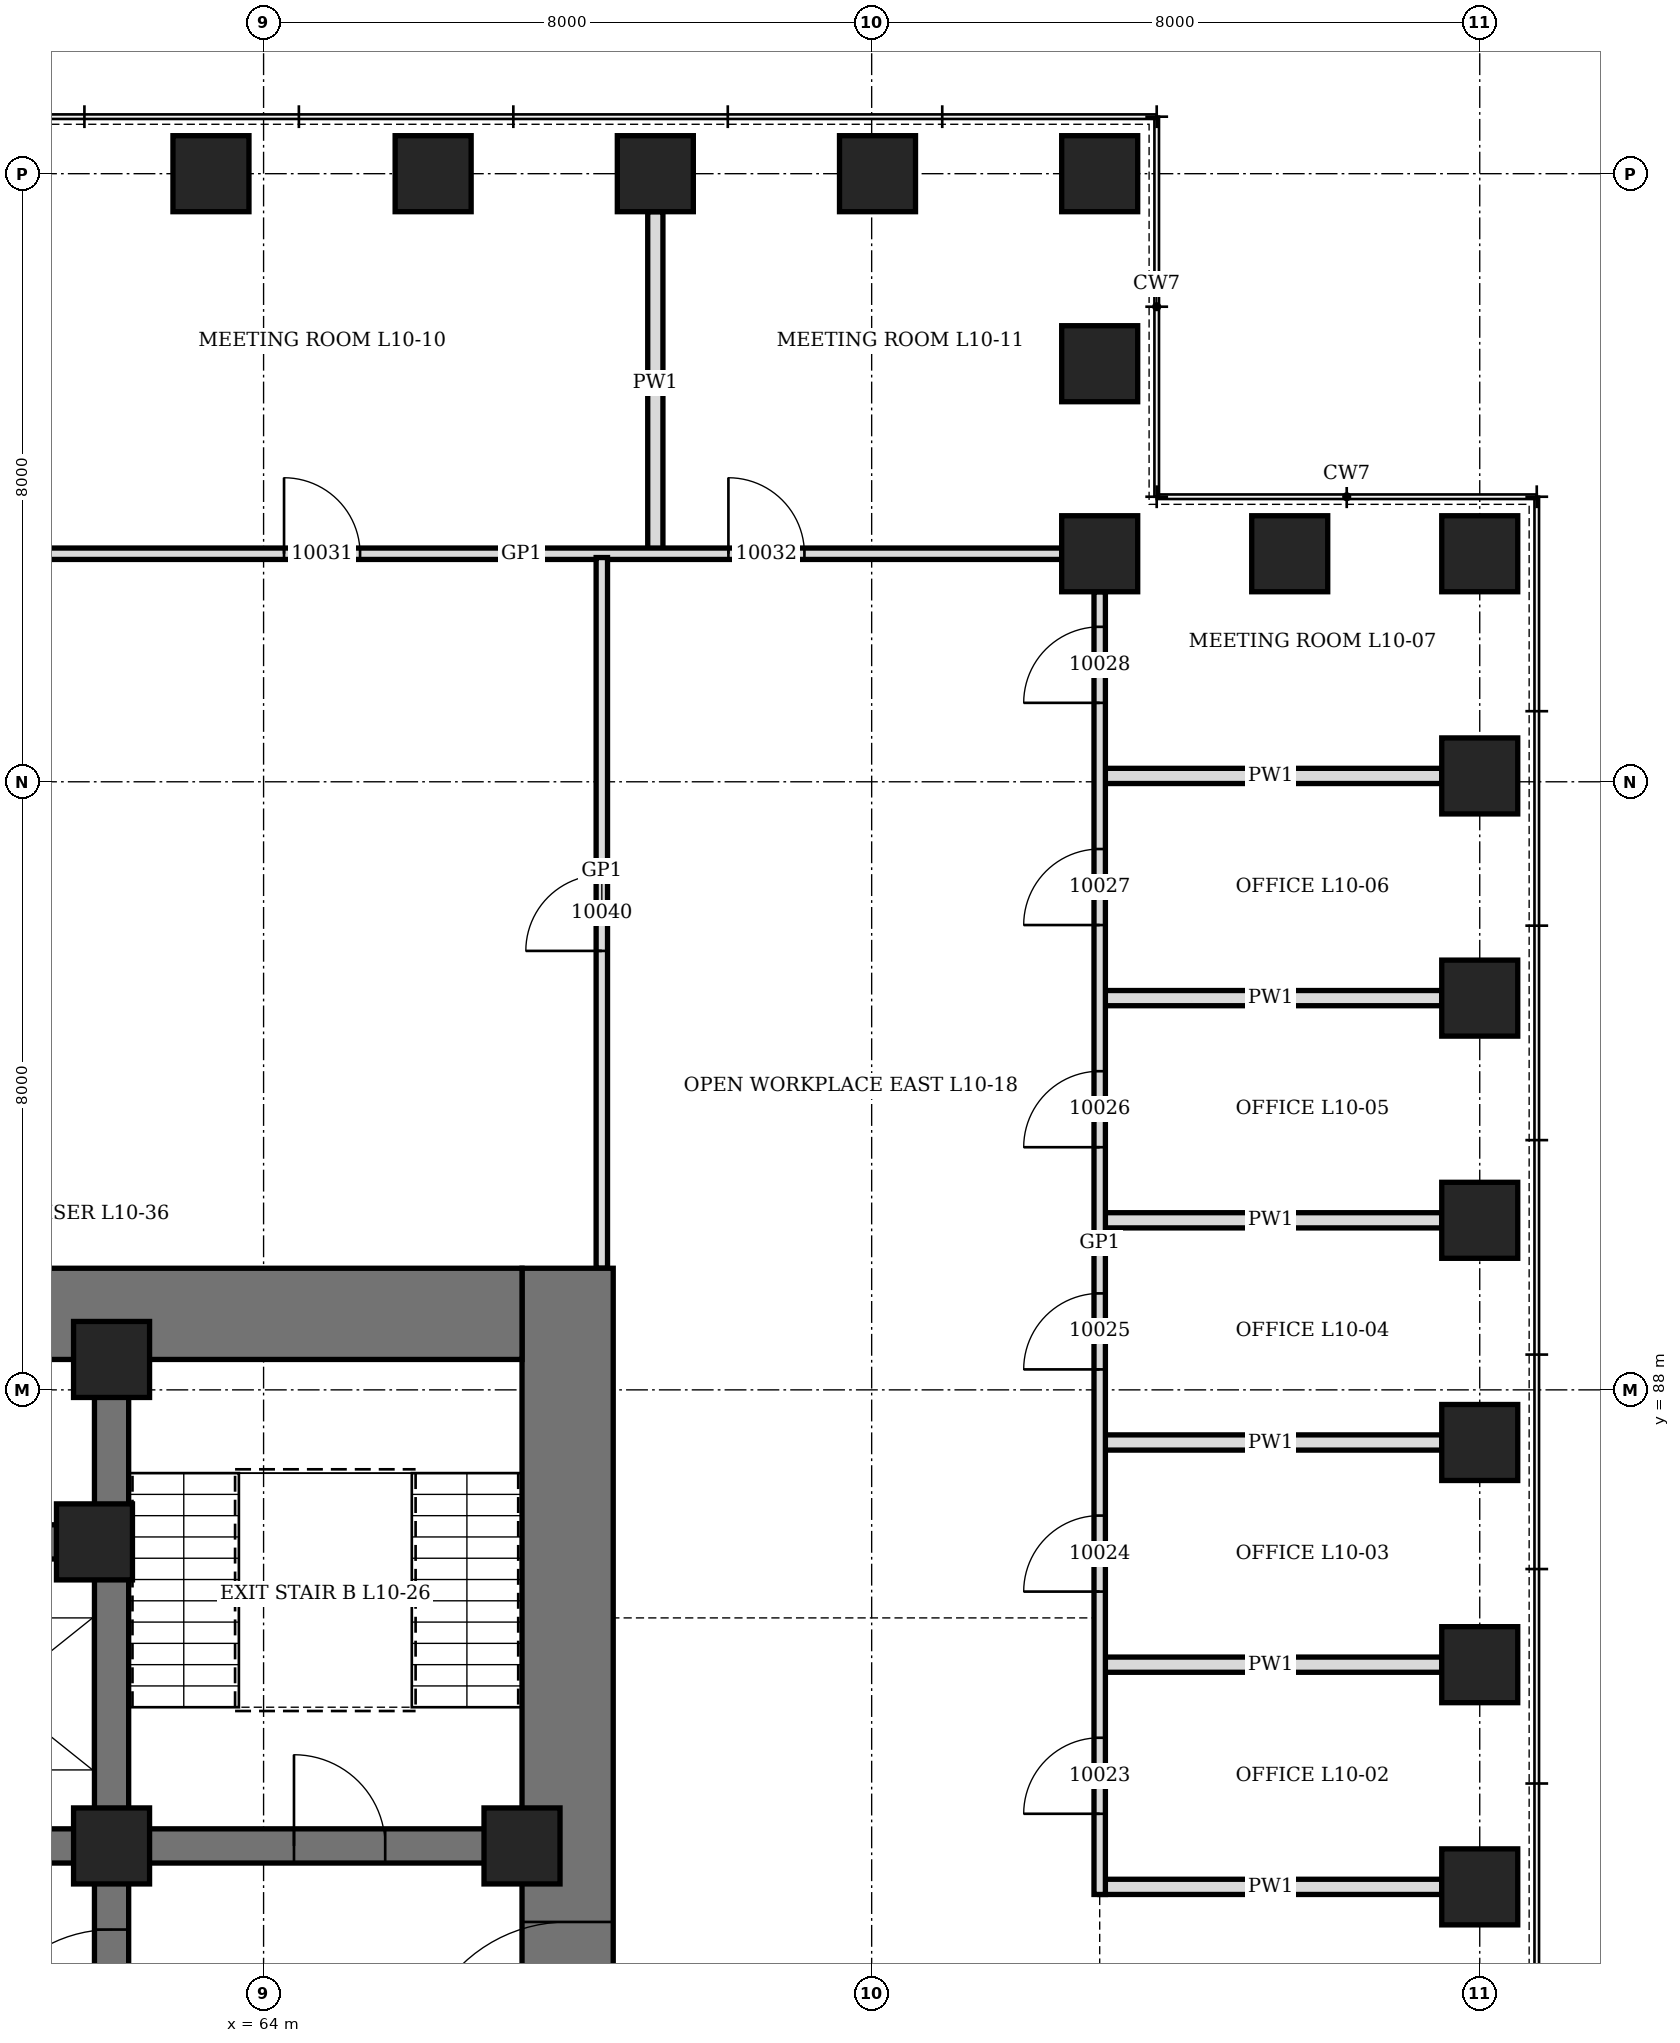
"""IFC4 building model, lengths in metres.
Left out: names, types, materials, properties, quantities, classifications, styles, units other than length and angle.
Written with IfcOpenShell. Run it as: python <this file> out.ifc"""

import sys

from ifc_helpers import new_model, si_unit, direction, frame, frame_2d, origin, origin_2d, place, context, subcontext, project, spatial, rectangle, hollow_rectangle, extrude, element, fill, save


model = new_model("IFC4")
c1 = context("Model", 3, precision=1e-05, world=origin(), true_north=direction((0.0, 1.0)))
c2 = subcontext(c1, "Body", "Model", "MODEL_VIEW")
j1 = project(units=[si_unit("LENGTHUNIT", "METRE"), si_unit("PLANEANGLEUNIT", "RADIAN")], contexts=[c1])
p1 = place(None, origin())
s1 = spatial("IfcSite", under=j1, at=p1, CompositionType="ELEMENT")
p2 = place(p1, origin())
s2 = spatial("IfcBuilding", under=s1, at=p2, CompositionType="ELEMENT")
p3 = place(p2, frame((0.0, 0.0, 51.7)))
s3 = spatial("IfcBuildingStorey", under=s2, at=p3, CompositionType="ELEMENT", Elevation=51.7)
for number, where, z_axis, x_axis in (
    (1, (80.0, 81.461, 0.0), (0.0, 0.0, 1.0), (0.0, 1.0, 0.0)),
    (2, (80.0, 84.385, 0.0), (0.0, 0.0, 1.0), (0.0, 1.0, 0.0)),
    (3, (80.0, 87.308, 0.0), (0.0, 0.0, 1.0), (0.0, 1.0, 0.0)),
    (4, (80.0, 90.231, 0.0), (0.0, 0.0, 1.0), (0.0, 1.0, 0.0)),
    (5, (80.0, 93.154, 0.0), (0.0, 0.0, 1.0), (0.0, 1.0, 0.0)),
    (6, (80.0, 96.077, 0.0), (0.0, 0.0, 1.0), (0.0, 1.0, 0.0)),
    (7, (80.0, 99.0, 0.0), (0.0, 0.0, 1.0), (1.0, 0.0, 0.0)),
    (8, (77.5, 99.0, 0.0), (0.0, 0.0, 1.0), (1.0, 0.0, 0.0)),
    (9, (75.0, 99.0, 0.0), (0.0, 0.0, 1.0), (0.0, 1.0, 0.0)),
    (10, (75.0, 101.5, 0.0), (0.0, 0.0, 1.0), (0.0, 1.0, 0.0)),
    (11, (75.0, 104.0, 0.0), (0.0, 0.0, 1.0), (1.0, 0.0, 0.0)),
    (12, (72.077, 104.0, 0.0), (0.0, 0.0, 1.0), (1.0, 0.0, 0.0)),
    (13, (69.154, 104.0, 0.0), (0.0, 0.0, 1.0), (1.0, 0.0, 0.0)),
    (14, (66.231, 104.0, 0.0), (0.0, 0.0, 1.0), (1.0, 0.0, 0.0)),
    (15, (63.308, 104.0, 0.0), (0.0, 0.0, 1.0), (1.0, 0.0, 0.0)),
):
    element("IfcColumn", number, at=place(p3, frame(where, z_axis=z_axis, x_axis=x_axis)), inside=s3, PredefinedType="COLUMN", context=c2, shape_type="SweptSolid", body=[
        extrude(hollow_rectangle(XDim=1.0, YDim=1.0, WallThickness=0.25, at=origin_2d()), origin(), (0.0, 0.0, 1.0), 4.2),
    ])
p4 = place(p3, frame((68.0, 70.4, 0.0), z_axis=(0.0, 0.0, 1.0), x_axis=(0.0, 1.0, 0.0)))
e16 = element("IfcWall", 16, at=p4, inside=s3, PredefinedType="SHEAR", context=c2, shape_type="SweptSolid", body=[
    extrude(rectangle(XDim=19.2, YDim=1.2, at=frame_2d((9.6, 0.0))), origin(), (0.0, 0.0, 1.0), 4.2),
])
p5 = place(p4, frame((8.6, 0.0, 0.0)))
e17 = element("IfcOpeningElement", 17, at=p5, cuts=e16, PredefinedType="OPENING", context=c2, shape_type="SweptSolid", body=[
    extrude(rectangle(XDim=2.0, YDim=2.4, at=frame_2d((1.0, 1.2))), frame((0.0, 0.61, 0.0), z_axis=(0.0, -1.0, 0.0), x_axis=(1.0, 0.0, 0.0)), (0.0, 0.0, 1.0), 1.22),
])
p6 = place(p3, frame((44.6, 89.0, 0.0), z_axis=(0.0, 0.0, 1.0), x_axis=(1.0, 0.0, 0.0)))
e18 = element("IfcWall", 18, at=p6, inside=s3, PredefinedType="SHEAR", context=c2, shape_type="SweptSolid", body=[
    extrude(rectangle(XDim=22.8, YDim=1.2, at=frame_2d((11.4, 0.0))), origin(), (0.0, 0.0, 1.0), 4.2),
])
p7 = place(p6, frame((6.325, 0.0, 0.0)))
e19 = element("IfcOpeningElement", 19, at=p7, cuts=e18, PredefinedType="OPENING", context=c2, shape_type="SweptSolid", body=[
    extrude(rectangle(XDim=1.0, YDim=2.1, at=frame_2d((0.5, 1.05))), frame((0.0, 0.61, 0.0), z_axis=(0.0, -1.0, 0.0), x_axis=(1.0, 0.0, 0.0)), (0.0, 0.0, 1.0), 1.22),
])
p8 = place(p6, frame((9.25, 0.0, 0.0)))
e20 = element("IfcOpeningElement", 20, at=p8, cuts=e18, PredefinedType="OPENING", context=c2, shape_type="SweptSolid", body=[
    extrude(rectangle(XDim=0.9, YDim=2.1, at=frame_2d((0.45, 1.05))), frame((0.0, 0.61, 0.0), z_axis=(0.0, -1.0, 0.0), x_axis=(1.0, 0.0, 0.0)), (0.0, 0.0, 1.0), 1.22),
])
p9 = place(p6, frame((12.025, 0.0, 0.0)))
e21 = element("IfcOpeningElement", 21, at=p9, cuts=e18, PredefinedType="OPENING", context=c2, shape_type="SweptSolid", body=[
    extrude(rectangle(XDim=0.9, YDim=2.1, at=frame_2d((0.45, 1.05))), frame((0.0, 0.61, 0.0), z_axis=(0.0, -1.0, 0.0), x_axis=(1.0, 0.0, 0.0)), (0.0, 0.0, 1.0), 1.22),
])
p10 = place(p6, frame((13.962, 0.0, 0.0)))
e22 = element("IfcOpeningElement", 22, at=p10, cuts=e18, PredefinedType="OPENING", context=c2, shape_type="SweptSolid", body=[
    extrude(rectangle(XDim=0.9, YDim=2.1, at=frame_2d((0.45, 1.05))), frame((0.0, 0.61, 0.0), z_axis=(0.0, -1.0, 0.0), x_axis=(1.0, 0.0, 0.0)), (0.0, 0.0, 1.0), 1.22),
])
p11 = place(p3, frame((62.0, 71.6, 0.0), z_axis=(0.0, 0.0, 1.0), x_axis=(0.0, 1.0, 0.0)))
e23 = element("IfcWall", 23, at=p11, inside=s3, PredefinedType="SHEAR", context=c2, shape_type="SweptSolid", body=[
    extrude(rectangle(XDim=16.8, YDim=0.45, at=frame_2d((8.4, 0.0))), origin(), (0.0, 0.0, 1.0), 4.2),
])
p12 = place(p11, frame((7.5, 0.0, 0.0)))
e24 = element("IfcOpeningElement", 24, at=p12, cuts=e23, PredefinedType="OPENING", context=c2, shape_type="SweptSolid", body=[
    extrude(rectangle(XDim=1.8, YDim=2.4, at=frame_2d((0.9, 1.2))), frame((0.0, 0.235, 0.0), z_axis=(0.0, -1.0, 0.0), x_axis=(1.0, 0.0, 0.0)), (0.0, 0.0, 1.0), 0.47),
])
p13 = place(p3, frame((62.225, 82.0, 0.0), z_axis=(0.0, 0.0, 1.0), x_axis=(1.0, 0.0, 0.0)))
e25 = element("IfcWall", 25, at=p13, inside=s3, PredefinedType="SHEAR", context=c2, shape_type="SweptSolid", body=[
    extrude(rectangle(XDim=5.175, YDim=0.45, at=frame_2d((2.587, 0.0))), origin(), (0.0, 0.0, 1.0), 4.2),
])
p14 = place(p13, frame((2.175, 0.0, 0.0)))
e26 = element("IfcOpeningElement", 26, at=p14, cuts=e25, PredefinedType="OPENING", context=c2, shape_type="SweptSolid", body=[
    extrude(rectangle(XDim=1.2, YDim=2.1, at=frame_2d((0.6, 1.05))), frame((0.0, 0.235, 0.0), z_axis=(0.0, -1.0, 0.0), x_axis=(1.0, 0.0, 0.0)), (0.0, 0.0, 1.0), 0.47),
])
for number, where, z_axis, x_axis in (
    (27, (50.225, 82.0, 0.0), (0.0, 0.0, 1.0), (1.0, 0.0, 0.0)),
    (28, (50.225, 86.0, 0.0), (0.0, 0.0, 1.0), (1.0, 0.0, 0.0)),
):
    element("IfcWall", number, at=place(p3, frame(where, z_axis=z_axis, x_axis=x_axis)), inside=s3, PredefinedType="SHEAR", context=c2, shape_type="SweptSolid", body=[
        extrude(rectangle(XDim=11.55, YDim=0.45, at=frame_2d((5.775, 0.0))), origin(), (0.0, 0.0, 1.0), 4.2),
    ])
for number, where, z_axis, x_axis in (
    (29, (61.775, 86.0, 0.0), (0.0, 0.0, 1.0), (1.0, 0.0, 0.0)),
    (30, (62.0, 82.0, 0.0), (0.0, 0.0, 1.0), (1.0, 0.0, 0.0)),
    (31, (62.0, 88.4, 0.0), (0.0, 0.0, 1.0), (1.0, 0.0, 0.0)),
    (32, (67.4, 82.0, 0.0), (0.0, 0.0, 1.0), (1.0, 0.0, 0.0)),
):
    element("IfcColumn", number, at=place(p3, frame(where, z_axis=z_axis, x_axis=x_axis)), inside=s3, PredefinedType="COLUMN", context=c2, shape_type="SweptSolid", body=[
        extrude(hollow_rectangle(XDim=1.0, YDim=1.0, WallThickness=0.15, at=origin_2d()), origin(), (0.0, 0.0, 1.0), 4.2),
    ])
for number, where, z_axis, x_axis in (
    (33, (75.0, 81.461, 0.0), (0.0, 0.0, 1.0), (1.0, 0.0, 0.0)),
    (34, (75.0, 84.385, 0.0), (0.0, 0.0, 1.0), (1.0, 0.0, 0.0)),
    (35, (75.0, 87.308, 0.0), (0.0, 0.0, 1.0), (1.0, 0.0, 0.0)),
    (36, (75.0, 90.231, 0.0), (0.0, 0.0, 1.0), (1.0, 0.0, 0.0)),
    (37, (75.0, 93.154, 0.0), (0.0, 0.0, 1.0), (1.0, 0.0, 0.0)),
    (38, (75.0, 96.077, 0.0), (0.0, 0.0, 1.0), (1.0, 0.0, 0.0)),
):
    element("IfcWall", number, at=place(p3, frame(where, z_axis=z_axis, x_axis=x_axis)), inside=s3, PredefinedType="PARTITIONING", context=c2, shape_type="SweptSolid", body=[
        extrude(rectangle(XDim=4.5, YDim=0.2, at=frame_2d((2.25, 0.0))), origin(), (0.0, 0.0, 1.0), 3.428),
    ])
p15 = place(p3, frame((69.154, 99.0, 0.0), z_axis=(0.0, 0.0, 1.0), x_axis=(0.0, 1.0, 0.0)))
e39 = element("IfcWall", 39, at=p15, inside=s3, PredefinedType="PARTITIONING", context=c2, shape_type="SweptSolid", body=[
    extrude(rectangle(XDim=4.5, YDim=0.2, at=frame_2d((2.25, 0.0))), origin(), (0.0, 0.0, 1.0), 3.278),
])
p16 = place(p3, frame((60.285, 99.0, 0.0), z_axis=(0.0, 0.0, 1.0), x_axis=(1.0, 0.0, 0.0)))
e40 = element("IfcWall", 40, at=p16, inside=s3, PredefinedType="PARTITIONING", context=c2, shape_type="SweptSolid", body=[
    extrude(rectangle(XDim=14.215, YDim=0.15, at=frame_2d((7.108, 0.0))), origin(), (0.0, 0.0, 1.0), 4.04),
])
p17 = place(p16, frame((3.985, 0.0, 0.0)))
e41 = element("IfcOpeningElement", 41, at=p17, cuts=e40, PredefinedType="OPENING", context=c2, shape_type="SweptSolid", body=[
    extrude(rectangle(XDim=1.0, YDim=2.4, at=frame_2d((0.5, 1.2))), frame((0.0, 0.085, 0.0), z_axis=(0.0, -1.0, 0.0), x_axis=(1.0, 0.0, 0.0)), (0.0, 0.0, 1.0), 0.17),
])
p18 = place(p16, frame((9.831, 0.0, 0.0)))
e42 = element("IfcOpeningElement", 42, at=p18, cuts=e40, PredefinedType="OPENING", context=c2, shape_type="SweptSolid", body=[
    extrude(rectangle(XDim=1.0, YDim=2.4, at=frame_2d((0.5, 1.2))), frame((0.0, 0.085, 0.0), z_axis=(0.0, -1.0, 0.0), x_axis=(1.0, 0.0, 0.0)), (0.0, 0.0, 1.0), 0.17),
])
p19 = place(p3, frame((68.45, 89.6, 0.0), z_axis=(0.0, 0.0, 1.0), x_axis=(0.0, 1.0, 0.0)))
e43 = element("IfcWall", 43, at=p19, inside=s3, PredefinedType="PARTITIONING", context=c2, shape_type="SweptSolid", body=[
    extrude(rectangle(XDim=9.35, YDim=0.15, at=frame_2d((4.675, 0.0))), origin(), (0.0, 0.0, 1.0), 4.04),
])
p20 = place(p19, frame((4.175, 0.0, 0.0)))
e44 = element("IfcOpeningElement", 44, at=p20, cuts=e43, PredefinedType="OPENING", context=c2, shape_type="SweptSolid", body=[
    extrude(rectangle(XDim=1.0, YDim=2.4, at=frame_2d((0.5, 1.2))), frame((0.0, 0.085, 0.0), z_axis=(0.0, -1.0, 0.0), x_axis=(1.0, 0.0, 0.0)), (0.0, 0.0, 1.0), 0.17),
])
p21 = place(p3, frame((75.0, 81.362, 0.0), z_axis=(0.0, 0.0, 1.0), x_axis=(0.0, 1.0, 0.0)))
e45 = element("IfcWall", 45, at=p21, inside=s3, PredefinedType="PARTITIONING", context=c2, shape_type="SweptSolid", body=[
    extrude(rectangle(XDim=17.138, YDim=0.15, at=frame_2d((8.569, 0.0))), origin(), (0.0, 0.0, 1.0), 4.04),
])
p22 = place(p21, frame((1.062, 0.0, 0.0)))
e46 = element("IfcOpeningElement", 46, at=p22, cuts=e45, PredefinedType="OPENING", context=c2, shape_type="SweptSolid", body=[
    extrude(rectangle(XDim=1.0, YDim=2.1, at=frame_2d((0.5, 1.05))), frame((0.0, 0.085, 0.0), z_axis=(0.0, -1.0, 0.0), x_axis=(1.0, 0.0, 0.0)), (0.0, 0.0, 1.0), 0.17),
])
p23 = place(p21, frame((3.985, 0.0, 0.0)))
e47 = element("IfcOpeningElement", 47, at=p23, cuts=e45, PredefinedType="OPENING", context=c2, shape_type="SweptSolid", body=[
    extrude(rectangle(XDim=1.0, YDim=2.1, at=frame_2d((0.5, 1.05))), frame((0.0, 0.085, 0.0), z_axis=(0.0, -1.0, 0.0), x_axis=(1.0, 0.0, 0.0)), (0.0, 0.0, 1.0), 0.17),
])
p24 = place(p21, frame((6.908, 0.0, 0.0)))
e48 = element("IfcOpeningElement", 48, at=p24, cuts=e45, PredefinedType="OPENING", context=c2, shape_type="SweptSolid", body=[
    extrude(rectangle(XDim=1.0, YDim=2.1, at=frame_2d((0.5, 1.05))), frame((0.0, 0.085, 0.0), z_axis=(0.0, -1.0, 0.0), x_axis=(1.0, 0.0, 0.0)), (0.0, 0.0, 1.0), 0.17),
])
p25 = place(p21, frame((9.831, 0.0, 0.0)))
e49 = element("IfcOpeningElement", 49, at=p25, cuts=e45, PredefinedType="OPENING", context=c2, shape_type="SweptSolid", body=[
    extrude(rectangle(XDim=1.0, YDim=2.1, at=frame_2d((0.5, 1.05))), frame((0.0, 0.085, 0.0), z_axis=(0.0, -1.0, 0.0), x_axis=(1.0, 0.0, 0.0)), (0.0, 0.0, 1.0), 0.17),
])
p26 = place(p21, frame((12.754, 0.0, 0.0)))
e50 = element("IfcOpeningElement", 50, at=p26, cuts=e45, PredefinedType="OPENING", context=c2, shape_type="SweptSolid", body=[
    extrude(rectangle(XDim=1.0, YDim=2.1, at=frame_2d((0.5, 1.05))), frame((0.0, 0.085, 0.0), z_axis=(0.0, -1.0, 0.0), x_axis=(1.0, 0.0, 0.0)), (0.0, 0.0, 1.0), 0.17),
])
p27 = place(p21, frame((15.677, 0.0, 0.0)))
e51 = element("IfcOpeningElement", 51, at=p27, cuts=e45, PredefinedType="OPENING", context=c2, shape_type="SweptSolid", body=[
    extrude(rectangle(XDim=1.0, YDim=2.4, at=frame_2d((0.5, 1.2))), frame((0.0, 0.085, 0.0), z_axis=(0.0, -1.0, 0.0), x_axis=(1.0, 0.0, 0.0)), (0.0, 0.0, 1.0), 0.17),
])
p28 = place(p14, origin())
e52 = element("IfcDoor", 52, at=p28, inside=s3, OperationType="SINGLE_SWING_LEFT", PredefinedType="DOOR", context=c2, shape_type="SweptSolid", body=[
    extrude(rectangle(XDim=1.2, YDim=2.1, at=frame_2d((0.6, 1.05))), frame((0.0, 0.225, 0.0), z_axis=(0.0, -1.0, 0.0), x_axis=(1.0, 0.0, 0.0)), (0.0, 0.0, 1.0), 0.449),
])
fill(e26, e52)
p29 = place(p5, origin())
e53 = element("IfcDoor", 53, at=p29, inside=s3, OperationType="DOUBLE_DOOR_SINGLE_SWING", PredefinedType="DOOR", context=c2, shape_type="SweptSolid", body=[
    extrude(rectangle(XDim=2.0, YDim=2.4, at=frame_2d((1.0, 1.2))), frame((0.0, 0.35, 0.0), z_axis=(0.0, -1.0, 0.0), x_axis=(1.0, 0.0, 0.0)), (0.0, 0.0, 1.0), 0.7),
])
fill(e17, e53)
p30 = place(p12, origin())
e54 = element("IfcDoor", 54, at=p30, inside=s3, OperationType="DOUBLE_DOOR_SINGLE_SWING", PredefinedType="DOOR", context=c2, shape_type="SweptSolid", body=[
    extrude(rectangle(XDim=1.8, YDim=2.4, at=frame_2d((0.9, 1.2))), frame((0.0, 0.225, 0.0), z_axis=(0.0, -1.0, 0.0), x_axis=(1.0, 0.0, 0.0)), (0.0, 0.0, 1.0), 0.449),
])
fill(e24, e54)
p31 = place(p22, origin())
e55 = element("IfcDoor", 55, at=p31, inside=s3, OperationType="SINGLE_SWING_LEFT", PredefinedType="DOOR", context=c2, shape_type="SweptSolid", body=[
    extrude(rectangle(XDim=1.0, YDim=2.1, at=frame_2d((0.5, 1.05))), frame((0.0, 0.075, 0.0), z_axis=(0.0, -1.0, 0.0), x_axis=(1.0, 0.0, 0.0)), (0.0, 0.0, 1.0), 0.149),
])
fill(e46, e55)
p32 = place(p23, origin())
e56 = element("IfcDoor", 56, at=p32, inside=s3, OperationType="SINGLE_SWING_LEFT", PredefinedType="DOOR", context=c2, shape_type="SweptSolid", body=[
    extrude(rectangle(XDim=1.0, YDim=2.1, at=frame_2d((0.5, 1.05))), frame((0.0, 0.075, 0.0), z_axis=(0.0, -1.0, 0.0), x_axis=(1.0, 0.0, 0.0)), (0.0, 0.0, 1.0), 0.149),
])
fill(e47, e56)
p33 = place(p24, origin())
e57 = element("IfcDoor", 57, at=p33, inside=s3, OperationType="SINGLE_SWING_LEFT", PredefinedType="DOOR", context=c2, shape_type="SweptSolid", body=[
    extrude(rectangle(XDim=1.0, YDim=2.1, at=frame_2d((0.5, 1.05))), frame((0.0, 0.075, 0.0), z_axis=(0.0, -1.0, 0.0), x_axis=(1.0, 0.0, 0.0)), (0.0, 0.0, 1.0), 0.149),
])
fill(e48, e57)
p34 = place(p25, origin())
e58 = element("IfcDoor", 58, at=p34, inside=s3, OperationType="SINGLE_SWING_LEFT", PredefinedType="DOOR", context=c2, shape_type="SweptSolid", body=[
    extrude(rectangle(XDim=1.0, YDim=2.1, at=frame_2d((0.5, 1.05))), frame((0.0, 0.075, 0.0), z_axis=(0.0, -1.0, 0.0), x_axis=(1.0, 0.0, 0.0)), (0.0, 0.0, 1.0), 0.149),
])
fill(e49, e58)
p35 = place(p26, origin())
e59 = element("IfcDoor", 59, at=p35, inside=s3, OperationType="SINGLE_SWING_LEFT", PredefinedType="DOOR", context=c2, shape_type="SweptSolid", body=[
    extrude(rectangle(XDim=1.0, YDim=2.1, at=frame_2d((0.5, 1.05))), frame((0.0, 0.075, 0.0), z_axis=(0.0, -1.0, 0.0), x_axis=(1.0, 0.0, 0.0)), (0.0, 0.0, 1.0), 0.149),
])
fill(e50, e59)
p36 = place(p27, origin())
e60 = element("IfcDoor", 60, at=p36, inside=s3, OperationType="SINGLE_SWING_RIGHT", PredefinedType="DOOR", context=c2, shape_type="SweptSolid", body=[
    extrude(rectangle(XDim=1.0, YDim=2.4, at=frame_2d((0.5, 1.2))), frame((0.0, 0.075, 0.0), z_axis=(0.0, -1.0, 0.0), x_axis=(1.0, 0.0, 0.0)), (0.0, 0.0, 1.0), 0.149),
])
fill(e51, e60)
p37 = place(p17, origin())
e61 = element("IfcDoor", 61, at=p37, inside=s3, OperationType="SINGLE_SWING_RIGHT", PredefinedType="DOOR", context=c2, shape_type="SweptSolid", body=[
    extrude(rectangle(XDim=1.0, YDim=2.4, at=frame_2d((0.5, 1.2))), frame((0.0, 0.075, 0.0), z_axis=(0.0, -1.0, 0.0), x_axis=(1.0, 0.0, 0.0)), (0.0, 0.0, 1.0), 0.149),
])
fill(e41, e61)
p38 = place(p18, origin())
e62 = element("IfcDoor", 62, at=p38, inside=s3, OperationType="SINGLE_SWING_RIGHT", PredefinedType="DOOR", context=c2, shape_type="SweptSolid", body=[
    extrude(rectangle(XDim=1.0, YDim=2.4, at=frame_2d((0.5, 1.2))), frame((0.0, 0.075, 0.0), z_axis=(0.0, -1.0, 0.0), x_axis=(1.0, 0.0, 0.0)), (0.0, 0.0, 1.0), 0.149),
])
fill(e42, e62)
p39 = place(p20, origin())
e63 = element("IfcDoor", 63, at=p39, inside=s3, OperationType="SINGLE_SWING_RIGHT", PredefinedType="DOOR", context=c2, shape_type="SweptSolid", body=[
    extrude(rectangle(XDim=1.0, YDim=2.4, at=frame_2d((0.5, 1.2))), frame((0.0, 0.075, 0.0), z_axis=(0.0, -1.0, 0.0), x_axis=(1.0, 0.0, 0.0)), (0.0, 0.0, 1.0), 0.149),
])
fill(e44, e63)
save(model, sys.argv[1])
